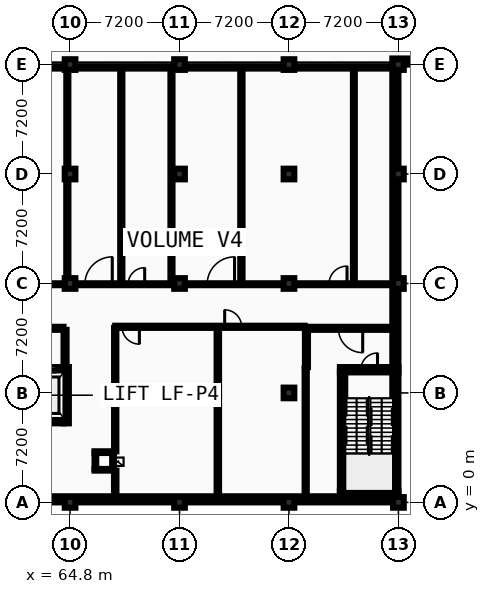
"""IFC4 building model, lengths in metres.
Left out: names, types, materials, properties, quantities, classifications, styles, units other than length and angle.
Written with IfcOpenShell. Run it as: python <this file> out.ifc"""

import sys

from ifc_helpers import new_model, si_unit, direction, frame, frame_2d, origin, origin_2d, place, context, subcontext, project, spatial, rectangle, extrude, element, fill, save


model = new_model("IFC4")
c1 = context("Model", 3, precision=1e-05, world=origin(), true_north=direction((0.0, 1.0)))
c2 = subcontext(c1, "Body", "Model", "MODEL_VIEW")
j1 = project(units=[si_unit("LENGTHUNIT", "METRE"), si_unit("PLANEANGLEUNIT", "RADIAN")], contexts=[c1])
p1 = place(None, origin())
s1 = spatial("IfcSite", under=j1, at=p1, CompositionType="ELEMENT")
p2 = place(p1, origin())
s2 = spatial("IfcBuilding", under=s1, at=p2, CompositionType="ELEMENT")
p3 = place(p2, frame((0.0, 0.0, -4.8)))
s3 = spatial("IfcBuildingStorey", under=s2, at=p3, CompositionType="ELEMENT", Elevation=-4.8)
for number, where, z_axis, x_axis in (
    (1, (64.8, 0.0, 0.0), (0.0, 0.0, 1.0), (1.0, 0.0, 0.0)),
    (2, (64.8, 14.4, 0.0), (0.0, 0.0, 1.0), (1.0, 0.0, 0.0)),
    (3, (64.8, 21.6, 0.0), (0.0, 0.0, 1.0), (1.0, 0.0, 0.0)),
    (4, (64.8, 28.8, 0.0), (0.0, 0.0, 1.0), (1.0, 0.0, 0.0)),
    (5, (72.0, 0.0, 0.0), (0.0, 0.0, 1.0), (1.0, 0.0, 0.0)),
    (6, (72.0, 7.2, 0.0), (0.0, 0.0, 1.0), (1.0, 0.0, 0.0)),
    (7, (72.0, 14.4, 0.0), (0.0, 0.0, 1.0), (1.0, 0.0, 0.0)),
    (8, (72.0, 21.6, 0.0), (0.0, 0.0, 1.0), (1.0, 0.0, 0.0)),
    (9, (72.0, 28.8, 0.0), (0.0, 0.0, 1.0), (1.0, 0.0, 0.0)),
    (10, (79.2, 0.0, 0.0), (0.0, 0.0, 1.0), (1.0, 0.0, 0.0)),
    (11, (79.2, 7.2, 0.0), (0.0, 0.0, 1.0), (1.0, 0.0, 0.0)),
    (12, (79.2, 14.4, 0.0), (0.0, 0.0, 1.0), (1.0, 0.0, 0.0)),
    (13, (79.2, 21.6, 0.0), (0.0, 0.0, 1.0), (1.0, 0.0, 0.0)),
    (14, (79.2, 28.8, 0.0), (0.0, 0.0, 1.0), (1.0, 0.0, 0.0)),
    (15, (86.4, 0.0, 0.0), (0.0, 0.0, 1.0), (1.0, 0.0, 0.0)),
    (16, (86.4, 14.4, 0.0), (0.0, 0.0, 1.0), (1.0, 0.0, 0.0)),
    (17, (86.4, 21.6, 0.0), (0.0, 0.0, 1.0), (1.0, 0.0, 0.0)),
    (18, (86.4, 28.8, 0.0), (0.0, 0.0, 1.0), (1.0, 0.0, 0.0)),
):
    element("IfcColumn", number, at=place(p3, frame(where, z_axis=z_axis, x_axis=x_axis)), inside=s3, PredefinedType="COLUMN", context=c2, shape_type="SweptSolid", body=[
        extrude(rectangle(XDim=0.7, YDim=0.7, at=origin_2d()), origin(), (0.0, 0.0, 1.0), 4.8),
    ])
p4 = place(p3, frame((0.0, 0.2, 0.0), z_axis=(0.0, 0.0, 1.0), x_axis=(1.0, 0.0, 0.0)))
e19 = element("IfcWall", 19, at=p4, inside=s3, PredefinedType="USERDEFINED", context=c2, shape_type="SweptSolid", body=[
    extrude(rectangle(XDim=86.4, YDim=0.4, at=frame_2d((43.2, 0.0))), origin(), (0.0, 0.0, 1.0), 4.545),
])
p5 = place(p3, frame((86.2, 0.4, 0.0), z_axis=(0.0, 0.0, 1.0), x_axis=(0.0, 1.0, 0.0)))
e20 = element("IfcWall", 20, at=p5, inside=s3, PredefinedType="USERDEFINED", context=c2, shape_type="SweptSolid", body=[
    extrude(rectangle(XDim=28.4, YDim=0.4, at=frame_2d((14.2, 0.0))), origin(), (0.0, 0.0, 1.0), 4.545),
])
p6 = place(p3, frame((86.0, 29.0, 0.0), z_axis=(0.0, 0.0, 1.0), x_axis=(1.0, 0.0, 0.0)))
e21 = element("IfcWall", 21, at=p6, inside=s3, PredefinedType="USERDEFINED", context=c2, shape_type="SweptSolid", body=[
    extrude(rectangle(XDim=36.4, YDim=0.4, at=frame_2d((18.2, 0.0))), origin(), (0.0, 0.0, 1.0), 4.545),
])
p7 = place(p3, frame((62.17, 5.375, 0.0), z_axis=(0.0, 0.0, 1.0), x_axis=(1.0, 0.0, 0.0)))
e22 = element("IfcWall", 22, at=p7, inside=s3, PredefinedType="SHEAR", context=c2, shape_type="SweptSolid", body=[
    extrude(rectangle(XDim=2.2, YDim=0.35, at=frame_2d((1.1, 0.0))), origin(), (0.0, 0.0, 1.0), 4.545),
])
p8 = place(p3, frame((62.17, 8.725, 0.0), z_axis=(0.0, 0.0, 1.0), x_axis=(1.0, 0.0, 0.0)))
e23 = element("IfcWall", 23, at=p8, inside=s3, PredefinedType="SHEAR", context=c2, shape_type="SweptSolid", body=[
    extrude(rectangle(XDim=2.2, YDim=0.35, at=frame_2d((1.1, 0.0))), origin(), (0.0, 0.0, 1.0), 4.545),
])
p9 = place(p8, frame((0.5, 0.0, 0.0)))
e24 = element("IfcOpeningElement", 24, at=p9, cuts=e23, PredefinedType="OPENING", context=c2, shape_type="SweptSolid", body=[
    extrude(rectangle(XDim=1.2, YDim=2.2, at=frame_2d((0.6, 1.1))), frame((0.0, 0.185, 0.0), z_axis=(0.0, -1.0, 0.0), x_axis=(1.0, 0.0, 0.0)), (0.0, 0.0, 1.0), 0.37),
])
p10 = place(p3, frame((64.545, 5.2, 0.0), z_axis=(0.0, 0.0, 1.0), x_axis=(0.0, 1.0, 0.0)))
e25 = element("IfcWall", 25, at=p10, inside=s3, PredefinedType="SHEAR", context=c2, shape_type="SweptSolid", body=[
    extrude(rectangle(XDim=3.7, YDim=0.35, at=frame_2d((1.85, 0.0))), origin(), (0.0, 0.0, 1.0), 4.545),
])
p11 = place(p3, frame((58.67, 11.45, 0.0), z_axis=(0.0, 0.0, 1.0), x_axis=(1.0, 0.0, 0.0)))
e26 = element("IfcWall", 26, at=p11, inside=s3, PredefinedType="PARTITIONING", context=c2, shape_type="SweptSolid", body=[
    extrude(rectangle(XDim=5.7, YDim=0.2, at=frame_2d((2.85, 0.0))), origin(), (0.0, 0.0, 1.0), 4.545),
])
p12 = place(p11, frame((2.05, 0.0, 0.0)))
e27 = element("IfcOpeningElement", 27, at=p12, cuts=e26, PredefinedType="OPENING", context=c2, shape_type="SweptSolid", body=[
    extrude(rectangle(XDim=1.6, YDim=2.2, at=frame_2d((0.8, 1.1))), frame((0.0, 0.11, 0.0), z_axis=(0.0, -1.0, 0.0), x_axis=(1.0, 0.0, 0.0)), (0.0, 0.0, 1.0), 0.22),
])
p13 = place(p3, frame((64.47, 8.9, 0.0), z_axis=(0.0, 0.0, 1.0), x_axis=(0.0, 1.0, 0.0)))
e28 = element("IfcWall", 28, at=p13, inside=s3, PredefinedType="PARTITIONING", context=c2, shape_type="SweptSolid", body=[
    extrude(rectangle(XDim=2.45, YDim=0.2, at=frame_2d((1.225, 0.0))), origin(), (0.0, 0.0, 1.0), 4.545),
])
p14 = place(p3, frame((82.55, 0.575, 0.0), z_axis=(0.0, 0.0, 1.0), x_axis=(1.0, 0.0, 0.0)))
e29 = element("IfcWall", 29, at=p14, inside=s3, PredefinedType="SHEAR", context=c2, shape_type="SweptSolid", body=[
    extrude(rectangle(XDim=3.85, YDim=0.35, at=frame_2d((1.925, 0.0))), origin(), (0.0, 0.0, 1.0), 4.545),
])
p15 = place(p3, frame((82.55, 8.725, 0.0), z_axis=(0.0, 0.0, 1.0), x_axis=(1.0, 0.0, 0.0)))
e30 = element("IfcWall", 30, at=p15, inside=s3, PredefinedType="SHEAR", context=c2, shape_type="SweptSolid", body=[
    extrude(rectangle(XDim=3.85, YDim=0.35, at=frame_2d((1.925, 0.0))), origin(), (0.0, 0.0, 1.0), 4.545),
])
p16 = place(p15, frame((1.375, 0.0, 0.0)))
e31 = element("IfcOpeningElement", 31, at=p16, cuts=e30, PredefinedType="OPENING", context=c2, shape_type="SweptSolid", body=[
    extrude(rectangle(XDim=1.1, YDim=2.15, at=frame_2d((0.55, 1.075))), frame((0.0, 0.185, 0.0), z_axis=(0.0, -1.0, 0.0), x_axis=(1.0, 0.0, 0.0)), (0.0, 0.0, 1.0), 0.37),
])
p17 = place(p3, frame((82.725, 0.75, 0.0), z_axis=(0.0, 0.0, 1.0), x_axis=(0.0, 1.0, 0.0)))
e32 = element("IfcWall", 32, at=p17, inside=s3, PredefinedType="SHEAR", context=c2, shape_type="SweptSolid", body=[
    extrude(rectangle(XDim=7.8, YDim=0.35, at=frame_2d((3.9, 0.0))), origin(), (0.0, 0.0, 1.0), 4.545),
])
p18 = place(p3, frame((80.45, 11.45, 0.0), z_axis=(0.0, 0.0, 1.0), x_axis=(1.0, 0.0, 0.0)))
e33 = element("IfcWall", 33, at=p18, inside=s3, PredefinedType="PARTITIONING", context=c2, shape_type="SweptSolid", body=[
    extrude(rectangle(XDim=5.6, YDim=0.2, at=frame_2d((2.8, 0.0))), origin(), (0.0, 0.0, 1.0), 4.545),
])
p19 = place(p18, frame((2.0, 0.0, 0.0)))
e34 = element("IfcOpeningElement", 34, at=p19, cuts=e33, PredefinedType="OPENING", context=c2, shape_type="SweptSolid", body=[
    extrude(rectangle(XDim=1.6, YDim=2.2, at=frame_2d((0.8, 1.1))), frame((0.0, 0.11, 0.0), z_axis=(0.0, -1.0, 0.0), x_axis=(1.0, 0.0, 0.0)), (0.0, 0.0, 1.0), 0.22),
])
p20 = place(p3, frame((80.35, 8.9, 0.0), z_axis=(0.0, 0.0, 1.0), x_axis=(0.0, 1.0, 0.0)))
e35 = element("IfcWall", 35, at=p20, inside=s3, PredefinedType="PARTITIONING", context=c2, shape_type="SweptSolid", body=[
    extrude(rectangle(XDim=2.45, YDim=0.2, at=frame_2d((1.225, 0.0))), origin(), (0.0, 0.0, 1.0), 4.545),
])
for number, where, z_axis, x_axis in (
    (36, (66.41, 2.145, 0.0), (0.0, 0.0, 1.0), (1.0, 0.0, 0.0)),
    (37, (66.41, 3.305, 0.0), (0.0, 0.0, 1.0), (1.0, 0.0, 0.0)),
):
    element("IfcWall", number, at=place(p3, frame(where, z_axis=z_axis, x_axis=x_axis)), inside=s3, PredefinedType="PARTITIONING", context=c2, shape_type="SweptSolid", body=[
        extrude(rectangle(XDim=1.27, YDim=0.11, at=frame_2d((0.635, 0.0))), origin(), (0.0, 0.0, 1.0), 4.54),
    ])
for number, where, z_axis, x_axis in (
    (38, (66.465, 2.2, 0.0), (0.0, 0.0, 1.0), (0.0, 1.0, 0.0)),
    (39, (67.625, 2.2, 0.0), (0.0, 0.0, 1.0), (0.0, 1.0, 0.0)),
):
    element("IfcWall", number, at=place(p3, frame(where, z_axis=z_axis, x_axis=x_axis)), inside=s3, PredefinedType="PARTITIONING", context=c2, shape_type="SweptSolid", body=[
        extrude(rectangle(XDim=1.05, YDim=0.11, at=frame_2d((0.525, 0.0))), origin(), (0.0, 0.0, 1.0), 4.54),
    ])
p21 = place(p3, frame((67.77, 11.55, 0.0), z_axis=(0.0, 0.0, 1.0), x_axis=(1.0, 0.0, 0.0)))
e40 = element("IfcWall", 40, at=p21, inside=s3, PredefinedType="PARTITIONING", context=c2, shape_type="SweptSolid", body=[
    extrude(rectangle(XDim=12.46, YDim=0.142, at=frame_2d((6.23, 0.0))), origin(), (0.0, 0.0, 1.0), 4.545),
])
p22 = place(p21, frame((7.2, 0.0, 0.0)))
e41 = element("IfcOpeningElement", 41, at=p22, cuts=e40, PredefinedType="OPENING", context=c2, shape_type="SweptSolid", body=[
    extrude(rectangle(XDim=1.114, YDim=2.04, at=frame_2d((0.557, 1.02))), frame((0.0, 0.081, 0.0), z_axis=(0.0, -1.0, 0.0), x_axis=(1.0, 0.0, 0.0)), (0.0, 0.0, 1.0), 0.162),
])
p23 = place(p21, frame((0.45, 0.0, 0.0)))
e42 = element("IfcOpeningElement", 42, at=p23, cuts=e40, PredefinedType="OPENING", context=c2, shape_type="SweptSolid", body=[
    extrude(rectangle(XDim=1.14, YDim=2.04, at=frame_2d((0.57, 1.02))), frame((0.0, 0.081, 0.0), z_axis=(0.0, -1.0, 0.0), x_axis=(1.0, 0.0, 0.0)), (0.0, 0.0, 1.0), 0.162),
])
p24 = place(p3, frame((58.7, 14.35, 0.0), z_axis=(0.0, 0.0, 1.0), x_axis=(1.0, 0.0, 0.0)))
e43 = element("IfcWall", 43, at=p24, inside=s3, PredefinedType="PARTITIONING", context=c2, shape_type="SweptSolid", body=[
    extrude(rectangle(XDim=5.72, YDim=0.125, at=frame_2d((2.86, 0.0))), origin(), (0.0, 0.0, 1.0), 4.095),
])
p25 = place(p24, frame((2.277, 0.0, 0.0)))
e44 = element("IfcOpeningElement", 44, at=p25, cuts=e43, PredefinedType="OPENING", context=c2, shape_type="SweptSolid", body=[
    extrude(rectangle(XDim=1.166, YDim=2.04, at=frame_2d((0.583, 1.02))), frame((0.0, 0.073, 0.0), z_axis=(0.0, -1.0, 0.0), x_axis=(1.0, 0.0, 0.0)), (0.0, 0.0, 1.0), 0.145),
])
p26 = place(p3, frame((65.18, 14.35, 0.0), z_axis=(0.0, 0.0, 1.0), x_axis=(1.0, 0.0, 0.0)))
e45 = element("IfcWall", 45, at=p26, inside=s3, PredefinedType="PARTITIONING", context=c2, shape_type="SweptSolid", body=[
    extrude(rectangle(XDim=6.44, YDim=0.125, at=frame_2d((3.22, 0.0))), origin(), (0.0, 0.0, 1.0), 4.095),
])
p27 = place(p26, frame((3.44, 0.0, 0.0)))
e46 = element("IfcOpeningElement", 46, at=p27, cuts=e45, PredefinedType="OPENING", context=c2, shape_type="SweptSolid", body=[
    extrude(rectangle(XDim=1.088, YDim=2.04, at=frame_2d((0.544, 1.02))), frame((0.0, 0.073, 0.0), z_axis=(0.0, -1.0, 0.0), x_axis=(1.0, 0.0, 0.0)), (0.0, 0.0, 1.0), 0.145),
])
p28 = place(p26, frame((0.595, 0.0, 0.0)))
e47 = element("IfcOpeningElement", 47, at=p28, cuts=e45, PredefinedType="OPENING", context=c2, shape_type="SweptSolid", body=[
    extrude(rectangle(XDim=1.8, YDim=2.3, at=frame_2d((0.9, 1.15))), frame((0.0, 0.073, 0.0), z_axis=(0.0, -1.0, 0.0), x_axis=(1.0, 0.0, 0.0)), (0.0, 0.0, 1.0), 0.145),
])
p29 = place(p3, frame((72.38, 14.35, 0.0), z_axis=(0.0, 0.0, 1.0), x_axis=(1.0, 0.0, 0.0)))
e48 = element("IfcWall", 48, at=p29, inside=s3, PredefinedType="PARTITIONING", context=c2, shape_type="SweptSolid", body=[
    extrude(rectangle(XDim=6.44, YDim=0.125, at=frame_2d((3.22, 0.0))), origin(), (0.0, 0.0, 1.0), 4.095),
])
p30 = place(p29, frame((1.44, 0.0, 0.0)))
e49 = element("IfcOpeningElement", 49, at=p30, cuts=e48, PredefinedType="OPENING", context=c2, shape_type="SweptSolid", body=[
    extrude(rectangle(XDim=1.8, YDim=2.3, at=frame_2d((0.9, 1.15))), frame((0.0, 0.073, 0.0), z_axis=(0.0, -1.0, 0.0), x_axis=(1.0, 0.0, 0.0)), (0.0, 0.0, 1.0), 0.145),
])
p31 = place(p3, frame((79.58, 14.35, 0.0), z_axis=(0.0, 0.0, 1.0), x_axis=(1.0, 0.0, 0.0)))
e50 = element("IfcWall", 50, at=p31, inside=s3, PredefinedType="PARTITIONING", context=c2, shape_type="SweptSolid", body=[
    extrude(rectangle(XDim=6.4, YDim=0.125, at=frame_2d((3.2, 0.0))), origin(), (0.0, 0.0, 1.0), 4.095),
])
p32 = place(p31, frame((4.645, 0.0, 0.0)))
e51 = element("IfcOpeningElement", 51, at=p32, cuts=e50, PredefinedType="OPENING", context=c2, shape_type="SweptSolid", body=[
    extrude(rectangle(XDim=1.0, YDim=2.1, at=frame_2d((0.5, 1.05))), frame((0.0, 0.073, 0.0), z_axis=(0.0, -1.0, 0.0), x_axis=(1.0, 0.0, 0.0)), (0.0, 0.0, 1.0), 0.145),
])
p33 = place(p31, frame((2.248, 0.0, 0.0)))
e52 = element("IfcOpeningElement", 52, at=p33, cuts=e50, PredefinedType="OPENING", context=c2, shape_type="SweptSolid", body=[
    extrude(rectangle(XDim=1.192, YDim=2.04, at=frame_2d((0.596, 1.02))), frame((0.0, 0.073, 0.0), z_axis=(0.0, -1.0, 0.0), x_axis=(1.0, 0.0, 0.0)), (0.0, 0.0, 1.0), 0.145),
])
p34 = place(p3, frame((58.7, 28.6, 0.0), z_axis=(0.0, 0.0, 1.0), x_axis=(1.0, 0.0, 0.0)))
e53 = element("IfcWall", 53, at=p34, inside=s3, PredefinedType="PARTITIONING", context=c2, shape_type="SweptSolid", body=[
    extrude(rectangle(XDim=5.72, YDim=0.125, at=frame_2d((2.86, 0.0))), origin(), (0.0, 0.0, 1.0), 4.095),
])
for number, where, z_axis, x_axis in (
    (54, (65.18, 28.6, 0.0), (0.0, 0.0, 1.0), (1.0, 0.0, 0.0)),
    (55, (72.38, 28.6, 0.0), (0.0, 0.0, 1.0), (1.0, 0.0, 0.0)),
):
    element("IfcWall", number, at=place(p3, frame(where, z_axis=z_axis, x_axis=x_axis)), inside=s3, PredefinedType="PARTITIONING", context=c2, shape_type="SweptSolid", body=[
        extrude(rectangle(XDim=6.44, YDim=0.125, at=frame_2d((3.22, 0.0))), origin(), (0.0, 0.0, 1.0), 4.095),
    ])
p35 = place(p3, frame((79.58, 28.6, 0.0), z_axis=(0.0, 0.0, 1.0), x_axis=(1.0, 0.0, 0.0)))
e56 = element("IfcWall", 56, at=p35, inside=s3, PredefinedType="PARTITIONING", context=c2, shape_type="SweptSolid", body=[
    extrude(rectangle(XDim=6.4, YDim=0.125, at=frame_2d((3.2, 0.0))), origin(), (0.0, 0.0, 1.0), 4.095),
])
p36 = place(p3, frame((64.62, 14.78, 0.0), z_axis=(0.0, 0.0, 1.0), x_axis=(0.0, 1.0, 0.0)))
e57 = element("IfcWall", 57, at=p36, inside=s3, PredefinedType="PARTITIONING", context=c2, shape_type="SweptSolid", body=[
    extrude(rectangle(XDim=6.44, YDim=0.142, at=frame_2d((3.22, 0.0))), origin(), (0.0, 0.0, 1.0), 4.245),
])
p37 = place(p3, frame((64.62, 21.98, 0.0), z_axis=(0.0, 0.0, 1.0), x_axis=(0.0, 1.0, 0.0)))
e58 = element("IfcWall", 58, at=p37, inside=s3, PredefinedType="PARTITIONING", context=c2, shape_type="SweptSolid", body=[
    extrude(rectangle(XDim=6.44, YDim=0.135, at=frame_2d((3.22, 0.0))), origin(), (0.0, 0.0, 1.0), 4.245),
])
p38 = place(p3, frame((67.77, 0.4, 0.0), z_axis=(0.0, 0.0, 1.0), x_axis=(0.0, 1.0, 0.0)))
e59 = element("IfcWall", 59, at=p38, inside=s3, PredefinedType="PARTITIONING", context=c2, shape_type="SweptSolid", body=[
    extrude(rectangle(XDim=1.69, YDim=0.16, at=frame_2d((0.845, 0.0))), origin(), (0.0, 0.0, 1.0), 4.545),
])
p39 = place(p3, frame((67.77, 3.36, 0.0), z_axis=(0.0, 0.0, 1.0), x_axis=(0.0, 1.0, 0.0)))
e60 = element("IfcWall", 60, at=p39, inside=s3, PredefinedType="PARTITIONING", context=c2, shape_type="SweptSolid", body=[
    extrude(rectangle(XDim=8.119, YDim=0.15, at=frame_2d((4.06, 0.0))), origin(), (0.0, 0.0, 1.0), 4.545),
])
p40 = place(p3, frame((68.17, 14.413, 0.0), z_axis=(0.0, 0.0, 1.0), x_axis=(0.0, 1.0, 0.0)))
e61 = element("IfcWall", 61, at=p40, inside=s3, PredefinedType="PARTITIONING", context=c2, shape_type="SweptSolid", body=[
    extrude(rectangle(XDim=14.125, YDim=0.142, at=frame_2d((7.062, 0.0))), origin(), (0.0, 0.0, 1.0), 4.545),
])
p41 = place(p3, frame((71.47, 14.413, 0.0), z_axis=(0.0, 0.0, 1.0), x_axis=(0.0, 1.0, 0.0)))
e62 = element("IfcWall", 62, at=p41, inside=s3, PredefinedType="PARTITIONING", context=c2, shape_type="SweptSolid", body=[
    extrude(rectangle(XDim=14.125, YDim=0.135, at=frame_2d((7.062, 0.0))), origin(), (0.0, 0.0, 1.0), 4.545),
])
p42 = place(p3, frame((74.52, 0.4, 0.0), z_axis=(0.0, 0.0, 1.0), x_axis=(0.0, 1.0, 0.0)))
e63 = element("IfcWall", 63, at=p42, inside=s3, PredefinedType="PARTITIONING", context=c2, shape_type="SweptSolid", body=[
    extrude(rectangle(XDim=11.079, YDim=0.16, at=frame_2d((5.54, 0.0))), origin(), (0.0, 0.0, 1.0), 4.235),
])
p43 = place(p3, frame((76.07, 14.413, 0.0), z_axis=(0.0, 0.0, 1.0), x_axis=(0.0, 1.0, 0.0)))
e64 = element("IfcWall", 64, at=p43, inside=s3, PredefinedType="PARTITIONING", context=c2, shape_type="SweptSolid", body=[
    extrude(rectangle(XDim=14.125, YDim=0.15, at=frame_2d((7.062, 0.0))), origin(), (0.0, 0.0, 1.0), 4.545),
])
p44 = place(p3, frame((80.3, 0.4, 0.0), z_axis=(0.0, 0.0, 1.0), x_axis=(0.0, 1.0, 0.0)))
e65 = element("IfcWall", 65, at=p44, inside=s3, PredefinedType="PARTITIONING", context=c2, shape_type="SweptSolid", body=[
    extrude(rectangle(XDim=8.4, YDim=0.142, at=frame_2d((4.2, 0.0))), origin(), (0.0, 0.0, 1.0), 4.545),
])
p45 = place(p3, frame((83.47, 14.413, 0.0), z_axis=(0.0, 0.0, 1.0), x_axis=(0.0, 1.0, 0.0)))
e66 = element("IfcWall", 66, at=p45, inside=s3, PredefinedType="PARTITIONING", context=c2, shape_type="SweptSolid", body=[
    extrude(rectangle(XDim=14.125, YDim=0.125, at=frame_2d((7.062, 0.0))), origin(), (0.0, 0.0, 1.0), 4.545),
])
p46 = place(p9, origin())
e67 = element("IfcDoor", 67, at=p46, inside=s3, OperationType="SLIDING_TO_RIGHT", PredefinedType="DOOR", context=c2, shape_type="SweptSolid", body=[
    extrude(rectangle(XDim=1.2, YDim=2.2, at=frame_2d((0.6, 1.1))), frame((0.0, 0.025, 0.0), z_axis=(0.0, -1.0, 0.0), x_axis=(1.0, 0.0, 0.0)), (0.0, 0.0, 1.0), 0.05),
])
fill(e24, e67)
p47 = place(p16, frame((1.1, 0.0, 0.0), z_axis=(0.0, 0.0, 1.0), x_axis=(-1.0, 0.0, 0.0)))
e68 = element("IfcDoor", 68, at=p47, inside=s3, OperationType="SINGLE_SWING_RIGHT", PredefinedType="DOOR", context=c2, shape_type="SweptSolid", body=[
    extrude(rectangle(XDim=1.1, YDim=2.15, at=frame_2d((0.55, 1.075))), frame((0.0, 0.025, 0.0), z_axis=(0.0, -1.0, 0.0), x_axis=(1.0, 0.0, 0.0)), (0.0, 0.0, 1.0), 0.05),
])
fill(e31, e68)
p48 = place(p19, origin())
e69 = element("IfcDoor", 69, at=p48, inside=s3, OperationType="DOUBLE_DOOR_SINGLE_SWING", PredefinedType="DOOR", context=c2, shape_type="SweptSolid", body=[
    extrude(rectangle(XDim=1.6, YDim=2.2, at=frame_2d((0.8, 1.1))), frame((0.0, 0.025, 0.0), z_axis=(0.0, -1.0, 0.0), x_axis=(1.0, 0.0, 0.0)), (0.0, 0.0, 1.0), 0.05),
])
fill(e34, e69)
p49 = place(p32, frame((1.0, 0.0, 0.0), z_axis=(0.0, 0.0, 1.0), x_axis=(-1.0, 0.0, 0.0)))
e70 = element("IfcDoor", 70, at=p49, inside=s3, OperationType="SLIDING_TO_LEFT", PredefinedType="DOOR", context=c2, shape_type="SweptSolid", body=[
    extrude(rectangle(XDim=1.0, YDim=2.1, at=frame_2d((0.5, 1.05))), frame((0.0, 0.025, 0.0), z_axis=(0.0, -1.0, 0.0), x_axis=(1.0, 0.0, 0.0)), (0.0, 0.0, 1.0), 0.05),
])
fill(e51, e70)
p50 = place(p27, frame((1.088, 0.0, 0.0), z_axis=(0.0, 0.0, 1.0), x_axis=(-1.0, 0.0, 0.0)))
e71 = element("IfcDoor", 71, at=p50, inside=s3, OperationType="SINGLE_SWING_RIGHT", PredefinedType="DOOR", context=c2, shape_type="SweptSolid", body=[
    extrude(rectangle(XDim=1.088, YDim=2.04, at=frame_2d((0.544, 1.02))), frame((0.0, 0.025, 0.0), z_axis=(0.0, -1.0, 0.0), x_axis=(1.0, 0.0, 0.0)), (0.0, 0.0, 1.0), 0.05),
])
fill(e46, e71)
p51 = place(p28, frame((1.8, 0.0, 0.0), z_axis=(0.0, 0.0, 1.0), x_axis=(-1.0, 0.0, 0.0)))
e72 = element("IfcDoor", 72, at=p51, inside=s3, OperationType="DOUBLE_DOOR_SINGLE_SWING", PredefinedType="DOOR", context=c2, shape_type="SweptSolid", body=[
    extrude(rectangle(XDim=1.8, YDim=2.3, at=frame_2d((0.9, 1.15))), frame((0.0, 0.025, 0.0), z_axis=(0.0, -1.0, 0.0), x_axis=(1.0, 0.0, 0.0)), (0.0, 0.0, 1.0), 0.05),
])
fill(e47, e72)
p52 = place(p30, frame((1.8, 0.0, 0.0), z_axis=(0.0, 0.0, 1.0), x_axis=(-1.0, 0.0, 0.0)))
e73 = element("IfcDoor", 73, at=p52, inside=s3, OperationType="DOUBLE_DOOR_SINGLE_SWING", PredefinedType="DOOR", context=c2, shape_type="SweptSolid", body=[
    extrude(rectangle(XDim=1.8, YDim=2.3, at=frame_2d((0.9, 1.15))), frame((0.0, 0.025, 0.0), z_axis=(0.0, -1.0, 0.0), x_axis=(1.0, 0.0, 0.0)), (0.0, 0.0, 1.0), 0.05),
])
fill(e49, e73)
p53 = place(p22, origin())
e74 = element("IfcDoor", 74, at=p53, inside=s3, OperationType="SINGLE_SWING_LEFT", PredefinedType="DOOR", context=c2, shape_type="SweptSolid", body=[
    extrude(rectangle(XDim=1.114, YDim=2.04, at=frame_2d((0.557, 1.02))), frame((0.0, 0.025, 0.0), z_axis=(0.0, -1.0, 0.0), x_axis=(1.0, 0.0, 0.0)), (0.0, 0.0, 1.0), 0.05),
])
fill(e41, e74)
p54 = place(p23, origin())
e75 = element("IfcDoor", 75, at=p54, inside=s3, OperationType="SINGLE_SWING_RIGHT", PredefinedType="DOOR", context=c2, shape_type="SweptSolid", body=[
    extrude(rectangle(XDim=1.14, YDim=2.04, at=frame_2d((0.57, 1.02))), frame((0.0, 0.025, 0.0), z_axis=(0.0, -1.0, 0.0), x_axis=(1.0, 0.0, 0.0)), (0.0, 0.0, 1.0), 0.05),
])
fill(e42, e75)
p55 = place(p33, frame((1.192, 0.0, 0.0), z_axis=(0.0, 0.0, 1.0), x_axis=(-1.0, 0.0, 0.0)))
e76 = element("IfcDoor", 76, at=p55, inside=s3, OperationType="SINGLE_SWING_RIGHT", PredefinedType="DOOR", context=c2, shape_type="SweptSolid", body=[
    extrude(rectangle(XDim=1.192, YDim=2.04, at=frame_2d((0.596, 1.02))), frame((0.0, 0.025, 0.0), z_axis=(0.0, -1.0, 0.0), x_axis=(1.0, 0.0, 0.0)), (0.0, 0.0, 1.0), 0.05),
])
fill(e52, e76)
save(model, sys.argv[1])
